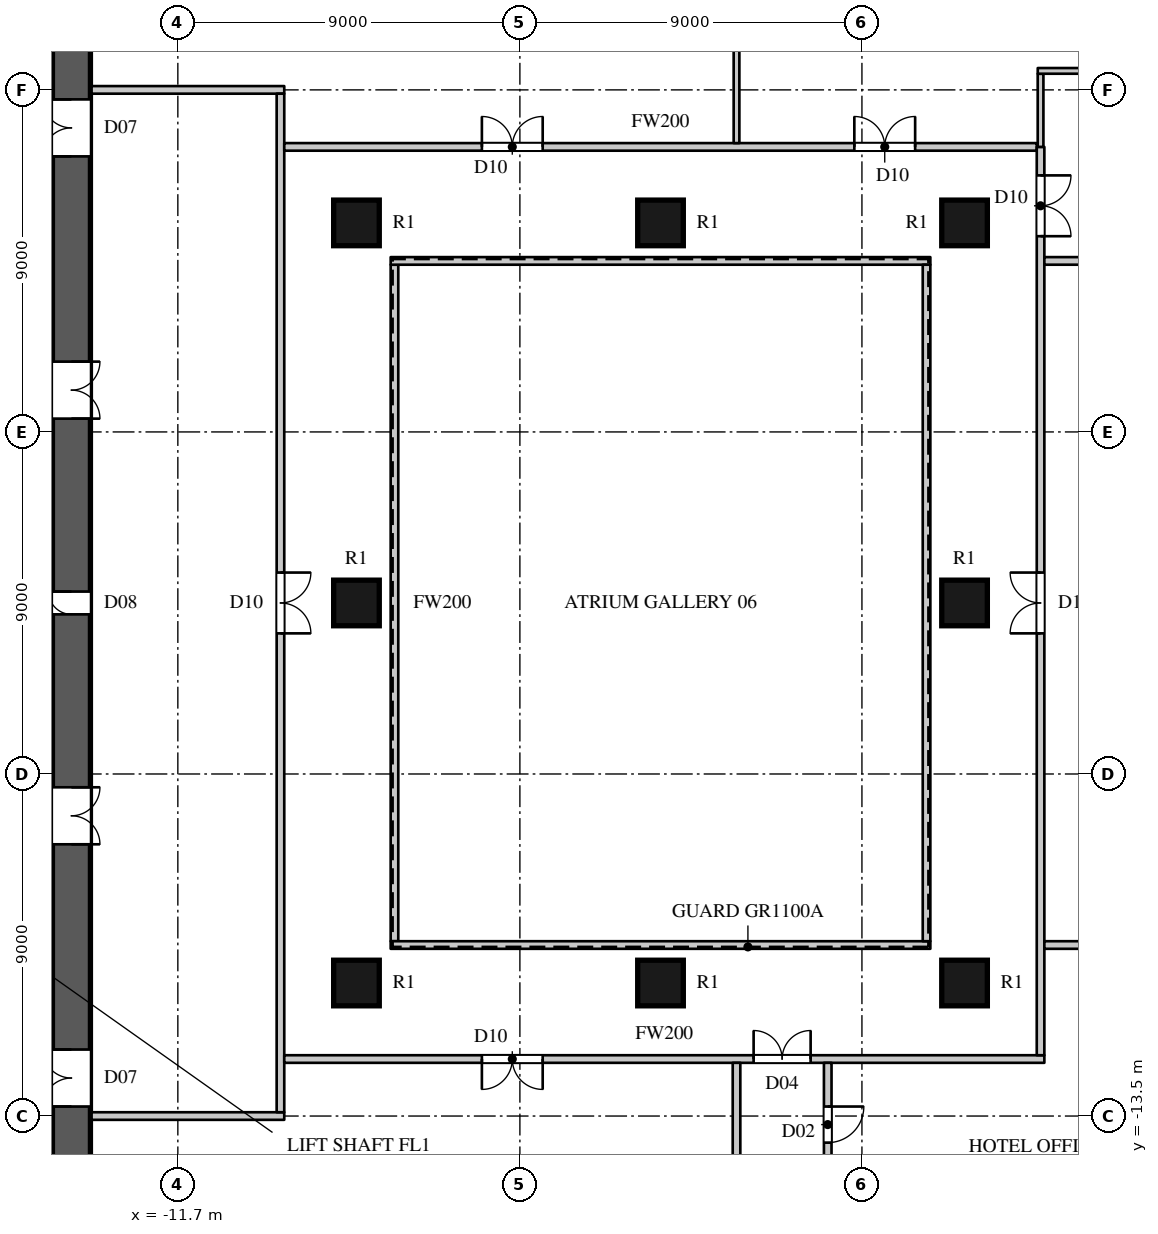
"""IFC4 building model, lengths in metres.
Left out: names, types, materials, properties, quantities, classifications, styles, units other than length and angle.
Written with IfcOpenShell. Run it as: python <this file> out.ifc"""

import sys

from ifc_helpers import new_model, si_unit, direction, frame, frame_2d, origin, origin_2d, place, context, subcontext, project, spatial, rectangle, circle, extrude, element, fill, save


model = new_model("IFC4")
c1 = context("Model", 3, precision=1e-05, world=origin(), true_north=direction((0.0, 1.0)))
c2 = subcontext(c1, "Body", "Model", "MODEL_VIEW")
j1 = project(units=[si_unit("LENGTHUNIT", "METRE"), si_unit("PLANEANGLEUNIT", "RADIAN")], contexts=[c1])
p1 = place(None, origin())
s1 = spatial("IfcSite", under=j1, at=p1, CompositionType="ELEMENT")
p2 = place(p1, origin())
s2 = spatial("IfcBuilding", under=s1, at=p2, CompositionType="ELEMENT")
p3 = place(p2, frame((0.0, 0.0, 50.0)))
s3 = spatial("IfcBuildingStorey", under=s2, at=p3, CompositionType="ELEMENT", Elevation=50.0)
for number, where, z_axis, x_axis in (
    (1, (-7.0, -10.0, 0.0), (0.0, 0.0, 1.0), (1.0, 0.0, 0.0)),
    (2, (-7.0, 0.0, 0.0), (0.0, 0.0, 1.0), (1.0, 0.0, 0.0)),
    (3, (-7.0, 10.0, 0.0), (0.0, 0.0, 1.0), (1.0, 0.0, 0.0)),
    (4, (1.0, -10.0, 0.0), (0.0, 0.0, 1.0), (1.0, 0.0, 0.0)),
    (5, (1.0, 10.0, 0.0), (0.0, 0.0, 1.0), (1.0, 0.0, 0.0)),
    (6, (9.0, -10.0, 0.0), (0.0, 0.0, 1.0), (1.0, 0.0, 0.0)),
    (7, (9.0, 0.0, 0.0), (0.0, 0.0, 1.0), (1.0, 0.0, 0.0)),
    (8, (9.0, 10.0, 0.0), (0.0, 0.0, 1.0), (1.0, 0.0, 0.0)),
):
    element("IfcColumn", number, at=place(p3, frame(where, z_axis=z_axis, x_axis=x_axis)), inside=s3, PredefinedType="COLUMN", context=c2, shape_type="SweptSolid", body=[
        extrude(circle(Radius=0.6, at=origin_2d()), origin(), (0.0, 0.0, 1.0), 5.5),
    ])
p4 = place(p3, frame((-14.5, -14.8, 0.0), z_axis=(0.0, 0.0, 1.0), x_axis=(0.0, 1.0, 0.0)))
e9 = element("IfcWall", 9, at=p4, inside=s3, PredefinedType="SHEAR", context=c2, shape_type="SweptSolid", body=[
    extrude(rectangle(XDim=29.6, YDim=1.0, at=frame_2d((14.8, 0.0))), origin(), (0.0, 0.0, 1.0), 5.5),
])
p5 = place(p4, frame((1.55, 0.0, 0.0)))
e10 = element("IfcOpeningElement", 10, at=p5, cuts=e9, PredefinedType="OPENING", context=c2, shape_type="SweptSolid", body=[
    extrude(rectangle(XDim=1.5, YDim=2.4, at=frame_2d((0.75, 1.2))), frame((0.0, 0.51, 0.0), z_axis=(0.0, -1.0, 0.0), x_axis=(1.0, 0.0, 0.0)), (0.0, 0.0, 1.0), 1.02),
])
p6 = place(p4, frame((26.55, 0.0, 0.0)))
e11 = element("IfcOpeningElement", 11, at=p6, cuts=e9, PredefinedType="OPENING", context=c2, shape_type="SweptSolid", body=[
    extrude(rectangle(XDim=1.5, YDim=2.4, at=frame_2d((0.75, 1.2))), frame((0.0, 0.51, 0.0), z_axis=(0.0, -1.0, 0.0), x_axis=(1.0, 0.0, 0.0)), (0.0, 0.0, 1.0), 1.02),
])
p7 = place(p4, frame((8.45, 0.0, 0.0)))
e12 = element("IfcOpeningElement", 12, at=p7, cuts=e9, PredefinedType="OPENING", context=c2, shape_type="SweptSolid", body=[
    extrude(rectangle(XDim=1.5, YDim=2.4, at=frame_2d((0.75, 1.2))), frame((0.0, 0.51, 0.0), z_axis=(0.0, -1.0, 0.0), x_axis=(1.0, 0.0, 0.0)), (0.0, 0.0, 1.0), 1.02),
])
p8 = place(p4, frame((19.65, 0.0, 0.0)))
e13 = element("IfcOpeningElement", 13, at=p8, cuts=e9, PredefinedType="OPENING", context=c2, shape_type="SweptSolid", body=[
    extrude(rectangle(XDim=1.5, YDim=2.4, at=frame_2d((0.75, 1.2))), frame((0.0, 0.51, 0.0), z_axis=(0.0, -1.0, 0.0), x_axis=(1.0, 0.0, 0.0)), (0.0, 0.0, 1.0), 1.02),
])
p9 = place(p4, frame((14.5, 0.0, 0.0)))
e14 = element("IfcOpeningElement", 14, at=p9, cuts=e9, PredefinedType="OPENING", context=c2, shape_type="SweptSolid", body=[
    extrude(rectangle(XDim=0.6, YDim=2.0, at=frame_2d((0.3, 1.0))), frame((0.0, 0.51, 0.0), z_axis=(0.0, -1.0, 0.0), x_axis=(1.0, 0.0, 0.0)), (0.0, 0.0, 1.0), 1.02),
])
for number, where, z_axis, x_axis in (
    (15, (-13.97, -13.5, 0.0), (0.0, 0.0, 1.0), (1.0, 0.0, 0.0)),
    (16, (-13.97, 13.5, 0.0), (0.0, 0.0, 1.0), (1.0, 0.0, 0.0)),
):
    element("IfcWall", number, at=place(p3, frame(where, z_axis=z_axis, x_axis=x_axis)), inside=s3, PredefinedType="PARTITIONING", context=c2, shape_type="SweptSolid", body=[
        extrude(rectangle(XDim=5.07, YDim=0.2, at=frame_2d((2.535, 0.0))), origin(), (0.0, 0.0, 1.0), 5.2),
    ])
p10 = place(p3, frame((-9.0, -13.4, 0.0), z_axis=(0.0, 0.0, 1.0), x_axis=(0.0, 1.0, 0.0)))
e17 = element("IfcWall", 17, at=p10, inside=s3, PredefinedType="PARTITIONING", context=c2, shape_type="SweptSolid", body=[
    extrude(rectangle(XDim=26.8, YDim=0.2, at=frame_2d((13.4, 0.0))), origin(), (0.0, 0.0, 1.0), 5.2),
])
p11 = place(p10, frame((12.6, 0.0, 0.0)))
e18 = element("IfcOpeningElement", 18, at=p11, cuts=e17, PredefinedType="OPENING", context=c2, shape_type="SweptSolid", body=[
    extrude(rectangle(XDim=1.6, YDim=2.4, at=frame_2d((0.8, 1.2))), frame((0.0, 0.11, 0.0), z_axis=(0.0, -1.0, 0.0), x_axis=(1.0, 0.0, 0.0)), (0.0, 0.0, 1.0), 0.22),
])
p12 = place(p3, frame((-8.9, -12.0, 0.0), z_axis=(0.0, 0.0, 1.0), x_axis=(1.0, 0.0, 0.0)))
e19 = element("IfcWall", 19, at=p12, inside=s3, PredefinedType="PARTITIONING", context=c2, shape_type="SweptSolid", body=[
    extrude(rectangle(XDim=20.0, YDim=0.2, at=frame_2d((10.0, 0.0))), origin(), (0.0, 0.0, 1.0), 5.2),
])
p13 = place(p12, frame((5.2, 0.0, 0.0)))
e20 = element("IfcOpeningElement", 20, at=p13, cuts=e19, PredefinedType="OPENING", context=c2, shape_type="SweptSolid", body=[
    extrude(rectangle(XDim=1.6, YDim=2.4, at=frame_2d((0.8, 1.2))), frame((0.0, 0.11, 0.0), z_axis=(0.0, -1.0, 0.0), x_axis=(1.0, 0.0, 0.0)), (0.0, 0.0, 1.0), 0.22),
])
p14 = place(p12, frame((12.35, 0.0, 0.0)))
e21 = element("IfcOpeningElement", 21, at=p14, cuts=e19, PredefinedType="OPENING", context=c2, shape_type="SweptSolid", body=[
    extrude(rectangle(XDim=1.5, YDim=2.2, at=frame_2d((0.75, 1.1))), frame((0.0, 0.11, 0.0), z_axis=(0.0, -1.0, 0.0), x_axis=(1.0, 0.0, 0.0)), (0.0, 0.0, 1.0), 0.22),
])
p15 = place(p3, frame((-8.9, 12.0, 0.0), z_axis=(0.0, 0.0, 1.0), x_axis=(1.0, 0.0, 0.0)))
e22 = element("IfcWall", 22, at=p15, inside=s3, PredefinedType="PARTITIONING", context=c2, shape_type="SweptSolid", body=[
    extrude(rectangle(XDim=19.8, YDim=0.2, at=frame_2d((9.9, 0.0))), origin(), (0.0, 0.0, 1.0), 5.2),
])
p16 = place(p15, frame((5.2, 0.0, 0.0)))
e23 = element("IfcOpeningElement", 23, at=p16, cuts=e22, PredefinedType="OPENING", context=c2, shape_type="SweptSolid", body=[
    extrude(rectangle(XDim=1.6, YDim=2.4, at=frame_2d((0.8, 1.2))), frame((0.0, 0.11, 0.0), z_axis=(0.0, -1.0, 0.0), x_axis=(1.0, 0.0, 0.0)), (0.0, 0.0, 1.0), 0.22),
])
p17 = place(p15, frame((15.0, 0.0, 0.0)))
e24 = element("IfcOpeningElement", 24, at=p17, cuts=e22, PredefinedType="OPENING", context=c2, shape_type="SweptSolid", body=[
    extrude(rectangle(XDim=1.6, YDim=2.4, at=frame_2d((0.8, 1.2))), frame((0.0, 0.11, 0.0), z_axis=(0.0, -1.0, 0.0), x_axis=(1.0, 0.0, 0.0)), (0.0, 0.0, 1.0), 0.22),
])
p18 = place(p3, frame((-6.0, -8.9, 0.0), z_axis=(0.0, 0.0, 1.0), x_axis=(0.0, 1.0, 0.0)))
e25 = element("IfcWall", 25, at=p18, inside=s3, PredefinedType="PARTITIONING", context=c2, shape_type="SweptSolid", body=[
    extrude(rectangle(XDim=17.8, YDim=0.2, at=frame_2d((8.9, 0.0))), origin(), (0.0, 0.0, 1.0), 5.2),
])
for number, where, z_axis, x_axis in (
    (26, (-6.1, -9.0, 0.0), (0.0, 0.0, 1.0), (1.0, 0.0, 0.0)),
    (27, (-6.1, 9.0, 0.0), (0.0, 0.0, 1.0), (1.0, 0.0, 0.0)),
):
    element("IfcWall", number, at=place(p3, frame(where, z_axis=z_axis, x_axis=x_axis)), inside=s3, PredefinedType="PARTITIONING", context=c2, shape_type="SweptSolid", body=[
        extrude(rectangle(XDim=14.2, YDim=0.2, at=frame_2d((7.1, 0.0))), origin(), (0.0, 0.0, 1.0), 5.2),
    ])
p19 = place(p3, frame((3.0, -17.48, 0.0), z_axis=(0.0, 0.0, 1.0), x_axis=(0.0, 1.0, 0.0)))
e28 = element("IfcWall", 28, at=p19, inside=s3, PredefinedType="PARTITIONING", context=c2, shape_type="SweptSolid", body=[
    extrude(rectangle(XDim=5.38, YDim=0.2, at=frame_2d((2.69, 0.0))), origin(), (0.0, 0.0, 1.0), 5.2),
])
p20 = place(p3, frame((5.4, -15.4, 0.0), z_axis=(0.0, 0.0, 1.0), x_axis=(0.0, 1.0, 0.0)))
e29 = element("IfcWall", 29, at=p20, inside=s3, PredefinedType="PARTITIONING", context=c2, shape_type="SweptSolid", body=[
    extrude(rectangle(XDim=3.3, YDim=0.2, at=frame_2d((1.65, 0.0))), origin(), (0.0, 0.0, 1.0), 5.2),
])
p21 = place(p20, frame((1.2, 0.0, 0.0)))
e30 = element("IfcOpeningElement", 30, at=p21, cuts=e29, PredefinedType="OPENING", context=c2, shape_type="SweptSolid", body=[
    extrude(rectangle(XDim=0.95, YDim=2.2, at=frame_2d((0.475, 1.1))), frame((0.0, 0.11, 0.0), z_axis=(0.0, -1.0, 0.0), x_axis=(1.0, 0.0, 0.0)), (0.0, 0.0, 1.0), 0.22),
])
p22 = place(p3, frame((8.0, -8.9, 0.0), z_axis=(0.0, 0.0, 1.0), x_axis=(0.0, 1.0, 0.0)))
e31 = element("IfcWall", 31, at=p22, inside=s3, PredefinedType="PARTITIONING", context=c2, shape_type="SweptSolid", body=[
    extrude(rectangle(XDim=17.8, YDim=0.2, at=frame_2d((8.9, 0.0))), origin(), (0.0, 0.0, 1.0), 5.2),
])
p23 = place(p3, frame((11.0, -11.9, 0.0), z_axis=(0.0, 0.0, 1.0), x_axis=(0.0, 1.0, 0.0)))
e32 = element("IfcWall", 32, at=p23, inside=s3, PredefinedType="PARTITIONING", context=c2, shape_type="SweptSolid", body=[
    extrude(rectangle(XDim=23.9, YDim=0.2, at=frame_2d((11.95, 0.0))), origin(), (0.0, 0.0, 1.0), 5.2),
])
p24 = place(p23, frame((21.55, 0.0, 0.0)))
e33 = element("IfcOpeningElement", 33, at=p24, cuts=e32, PredefinedType="OPENING", context=c2, shape_type="SweptSolid", body=[
    extrude(rectangle(XDim=1.6, YDim=2.4, at=frame_2d((0.8, 1.2))), frame((0.0, 0.11, 0.0), z_axis=(0.0, -1.0, 0.0), x_axis=(1.0, 0.0, 0.0)), (0.0, 0.0, 1.0), 0.22),
])
p25 = place(p23, frame((11.1, 0.0, 0.0)))
e34 = element("IfcOpeningElement", 34, at=p25, cuts=e32, PredefinedType="OPENING", context=c2, shape_type="SweptSolid", body=[
    extrude(rectangle(XDim=1.6, YDim=2.4, at=frame_2d((0.8, 1.2))), frame((0.0, 0.11, 0.0), z_axis=(0.0, -1.0, 0.0), x_axis=(1.0, 0.0, 0.0)), (0.0, 0.0, 1.0), 0.22),
])
p26 = place(p3, frame((11.1, -9.0, 0.0), z_axis=(0.0, 0.0, 1.0), x_axis=(1.0, 0.0, 0.0)))
e35 = element("IfcWall", 35, at=p26, inside=s3, PredefinedType="PARTITIONING", context=c2, shape_type="SweptSolid", body=[
    extrude(rectangle(XDim=5.9, YDim=0.2, at=frame_2d((2.95, 0.0))), origin(), (0.0, 0.0, 1.0), 4.55),
])
p27 = place(p3, frame((11.1, 9.0, 0.0), z_axis=(0.0, 0.0, 1.0), x_axis=(1.0, 0.0, 0.0)))
e36 = element("IfcWall", 36, at=p27, inside=s3, PredefinedType="PARTITIONING", context=c2, shape_type="SweptSolid", body=[
    extrude(rectangle(XDim=5.88, YDim=0.2, at=frame_2d((2.94, 0.0))), origin(), (0.0, 0.0, 1.0), 4.55),
])
p28 = place(p3, frame((3.0, 12.1, 0.0), z_axis=(0.0, 0.0, 1.0), x_axis=(0.0, 1.0, 0.0)))
e37 = element("IfcWall", 37, at=p28, inside=s3, PredefinedType="PARTITIONING", context=c2, shape_type="SweptSolid", body=[
    extrude(rectangle(XDim=13.625, YDim=0.15, at=frame_2d((6.812, 0.0))), origin(), (0.0, 0.0, 1.0), 5.2),
])
p29 = place(p3, frame((11.0, 12.0, 0.0), z_axis=(0.0, 0.0, 1.0), x_axis=(0.0, 1.0, 0.0)))
e38 = element("IfcWall", 38, at=p29, inside=s3, PredefinedType="PARTITIONING", context=c2, shape_type="SweptSolid", body=[
    extrude(rectangle(XDim=1.924, YDim=0.15, at=frame_2d((0.962, 0.0))), origin(), (0.0, 0.0, 1.0), 5.2),
])
p30 = place(p3, frame((10.926, 14.0, 0.0), z_axis=(0.0, 0.0, 1.0), x_axis=(1.0, 0.0, 0.0)))
e39 = element("IfcWall", 39, at=p30, inside=s3, PredefinedType="PARTITIONING", context=c2, shape_type="SweptSolid", body=[
    extrude(rectangle(XDim=3.149, YDim=0.15, at=frame_2d((1.574, 0.0))), origin(), (0.0, 0.0, 1.0), 5.2),
])
p31 = place(p11, origin())
e40 = element("IfcDoor", 40, at=p31, inside=s3, OperationType="DOUBLE_DOOR_SINGLE_SWING", PredefinedType="DOOR", context=c2, shape_type="SweptSolid", body=[
    extrude(rectangle(XDim=1.6, YDim=2.4, at=frame_2d((0.8, 1.2))), frame((0.0, 0.025, 0.0), z_axis=(0.0, -1.0, 0.0), x_axis=(1.0, 0.0, 0.0)), (0.0, 0.0, 1.0), 0.05),
])
fill(e18, e40)
p32 = place(p16, origin())
e41 = element("IfcDoor", 41, at=p32, inside=s3, OperationType="DOUBLE_DOOR_SINGLE_SWING", PredefinedType="DOOR", context=c2, shape_type="SweptSolid", body=[
    extrude(rectangle(XDim=1.6, YDim=2.4, at=frame_2d((0.8, 1.2))), frame((0.0, 0.025, 0.0), z_axis=(0.0, -1.0, 0.0), x_axis=(1.0, 0.0, 0.0)), (0.0, 0.0, 1.0), 0.05),
])
fill(e23, e41)
p33 = place(p13, origin())
e42 = element("IfcDoor", 42, at=p33, inside=s3, OperationType="DOUBLE_DOOR_SINGLE_SWING", PredefinedType="DOOR", context=c2, shape_type="SweptSolid", body=[
    extrude(rectangle(XDim=1.6, YDim=2.4, at=frame_2d((0.8, 1.2))), frame((0.0, 0.025, 0.0), z_axis=(0.0, -1.0, 0.0), x_axis=(1.0, 0.0, 0.0)), (0.0, 0.0, 1.0), 0.05),
])
fill(e20, e42)
p34 = place(p17, origin())
e43 = element("IfcDoor", 43, at=p34, inside=s3, OperationType="DOUBLE_DOOR_SINGLE_SWING", PredefinedType="DOOR", context=c2, shape_type="SweptSolid", body=[
    extrude(rectangle(XDim=1.6, YDim=2.4, at=frame_2d((0.8, 1.2))), frame((0.0, 0.025, 0.0), z_axis=(0.0, -1.0, 0.0), x_axis=(1.0, 0.0, 0.0)), (0.0, 0.0, 1.0), 0.05),
])
fill(e24, e43)
p35 = place(p24, origin())
e44 = element("IfcDoor", 44, at=p35, inside=s3, OperationType="DOUBLE_DOOR_SINGLE_SWING", PredefinedType="DOOR", context=c2, shape_type="SweptSolid", body=[
    extrude(rectangle(XDim=1.6, YDim=2.4, at=frame_2d((0.8, 1.2))), frame((0.0, 0.025, 0.0), z_axis=(0.0, -1.0, 0.0), x_axis=(1.0, 0.0, 0.0)), (0.0, 0.0, 1.0), 0.05),
])
fill(e33, e44)
p36 = place(p25, origin())
e45 = element("IfcDoor", 45, at=p36, inside=s3, OperationType="DOUBLE_DOOR_SINGLE_SWING", PredefinedType="DOOR", context=c2, shape_type="SweptSolid", body=[
    extrude(rectangle(XDim=1.6, YDim=2.4, at=frame_2d((0.8, 1.2))), frame((0.0, 0.025, 0.0), z_axis=(0.0, -1.0, 0.0), x_axis=(1.0, 0.0, 0.0)), (0.0, 0.0, 1.0), 0.05),
])
fill(e34, e45)
p37 = place(p14, origin())
e46 = element("IfcDoor", 46, at=p37, inside=s3, OperationType="DOUBLE_DOOR_SINGLE_SWING", PredefinedType="DOOR", context=c2, shape_type="SweptSolid", body=[
    extrude(rectangle(XDim=1.5, YDim=2.2, at=frame_2d((0.75, 1.1))), frame((0.0, 0.025, 0.0), z_axis=(0.0, -1.0, 0.0), x_axis=(1.0, 0.0, 0.0)), (0.0, 0.0, 1.0), 0.05),
])
fill(e21, e46)
p38 = place(p21, origin())
e47 = element("IfcDoor", 47, at=p38, inside=s3, OperationType="SINGLE_SWING_LEFT", PredefinedType="DOOR", context=c2, shape_type="SweptSolid", body=[
    extrude(rectangle(XDim=0.95, YDim=2.2, at=frame_2d((0.475, 1.1))), frame((0.0, 0.025, 0.0), z_axis=(0.0, -1.0, 0.0), x_axis=(1.0, 0.0, 0.0)), (0.0, 0.0, 1.0), 0.05),
])
fill(e30, e47)
p39 = place(p5, origin())
e48 = element("IfcDoor", 48, at=p39, inside=s3, OperationType="DOUBLE_DOOR_SINGLE_SWING", PredefinedType="DOOR", context=c2, shape_type="SweptSolid", body=[
    extrude(rectangle(XDim=1.5, YDim=2.4, at=frame_2d((0.75, 1.2))), frame((0.0, 0.495, 0.0), z_axis=(0.0, -1.0, 0.0), x_axis=(1.0, 0.0, 0.0)), (0.0, 0.0, 1.0), 0.05),
])
fill(e10, e48)
p40 = place(p6, origin())
e49 = element("IfcDoor", 49, at=p40, inside=s3, OperationType="DOUBLE_DOOR_SINGLE_SWING", PredefinedType="DOOR", context=c2, shape_type="SweptSolid", body=[
    extrude(rectangle(XDim=1.5, YDim=2.4, at=frame_2d((0.75, 1.2))), frame((0.0, 0.495, 0.0), z_axis=(0.0, -1.0, 0.0), x_axis=(1.0, 0.0, 0.0)), (0.0, 0.0, 1.0), 0.05),
])
fill(e11, e49)
p41 = place(p7, origin())
e50 = element("IfcDoor", 50, at=p41, inside=s3, OperationType="DOUBLE_DOOR_SINGLE_SWING", PredefinedType="DOOR", context=c2, shape_type="SweptSolid", body=[
    extrude(rectangle(XDim=1.5, YDim=2.4, at=frame_2d((0.75, 1.2))), frame((0.0, -0.445, 0.0), z_axis=(0.0, -1.0, 0.0), x_axis=(1.0, 0.0, 0.0)), (0.0, 0.0, 1.0), 0.05),
])
fill(e12, e50)
p42 = place(p8, origin())
e51 = element("IfcDoor", 51, at=p42, inside=s3, OperationType="DOUBLE_DOOR_SINGLE_SWING", PredefinedType="DOOR", context=c2, shape_type="SweptSolid", body=[
    extrude(rectangle(XDim=1.5, YDim=2.4, at=frame_2d((0.75, 1.2))), frame((0.0, -0.445, 0.0), z_axis=(0.0, -1.0, 0.0), x_axis=(1.0, 0.0, 0.0)), (0.0, 0.0, 1.0), 0.05),
])
fill(e13, e51)
p43 = place(p9, origin())
e52 = element("IfcDoor", 52, at=p43, inside=s3, OperationType="SINGLE_SWING_RIGHT", PredefinedType="DOOR", context=c2, shape_type="SweptSolid", body=[
    extrude(rectangle(XDim=0.6, YDim=2.0, at=frame_2d((0.3, 1.0))), frame((0.0, 0.495, 0.0), z_axis=(0.0, -1.0, 0.0), x_axis=(1.0, 0.0, 0.0)), (0.0, 0.0, 1.0), 0.05),
])
fill(e14, e52)
save(model, sys.argv[1])
